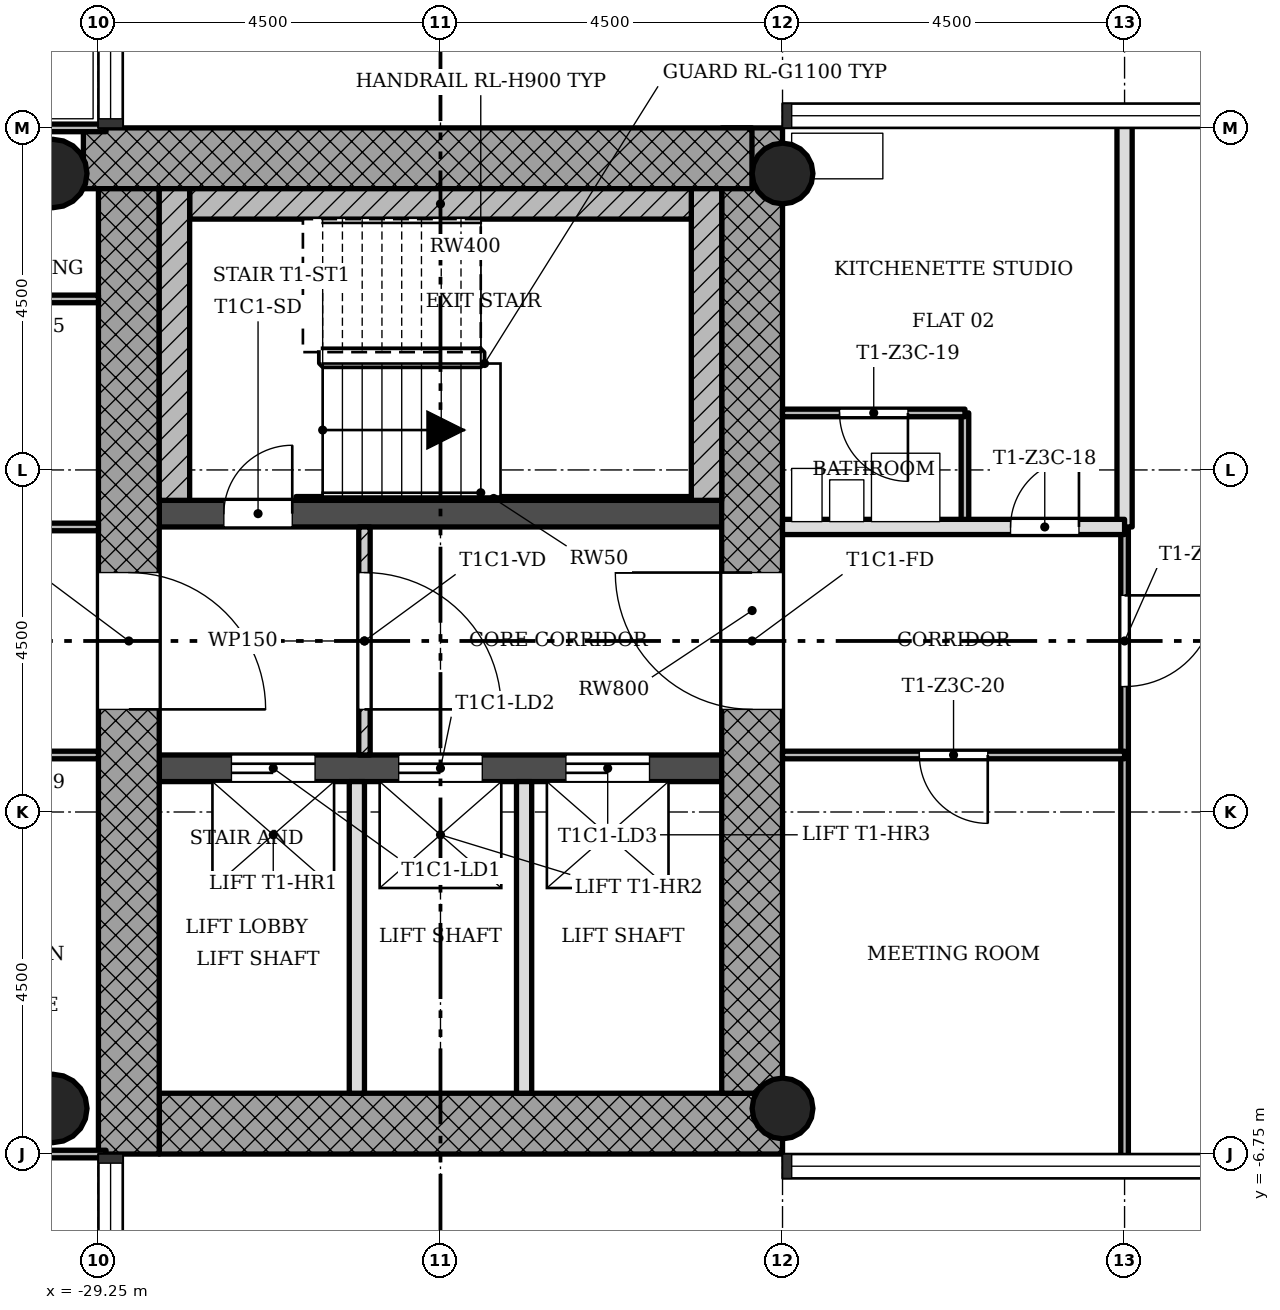
"""IFC4 building model, lengths in metres.
Left out: names, types, materials, properties, quantities, classifications, styles, units other than length and angle.
Written with IfcOpenShell. Run it as: python <this file> out.ifc"""

import sys

from ifc_helpers import new_model, si_unit, direction, frame, frame_2d, origin, origin_2d, place, context, subcontext, project, spatial, rectangle, hollow_circle, extrude, element, fill, save


model = new_model("IFC4")
c1 = context("Model", 3, precision=1e-05, world=origin(), true_north=direction((0.0, 1.0)))
c2 = subcontext(c1, "Body", "Model", "MODEL_VIEW")
j1 = project(units=[si_unit("LENGTHUNIT", "METRE"), si_unit("PLANEANGLEUNIT", "RADIAN")], contexts=[c1])
p1 = place(None, origin())
s1 = spatial("IfcSite", under=j1, at=p1, CompositionType="ELEMENT")
p2 = place(p1, origin())
s2 = spatial("IfcBuilding", under=s1, at=p2, CompositionType="ELEMENT")
p3 = place(p2, frame((0.0, 0.0, 160.9)))
s3 = spatial("IfcBuildingStorey", under=s2, at=p3, CompositionType="ELEMENT", Elevation=160.9)
p4 = place(p3, frame((-28.45, -6.35, 0.0), z_axis=(0.0, 0.0, 1.0), x_axis=(1.0, 0.0, 0.0)))
e1 = element("IfcWall", 1, at=p4, inside=s3, PredefinedType="SHEAR", context=c2, shape_type="SweptSolid", body=[
    extrude(rectangle(XDim=8.2, YDim=0.8, at=frame_2d((4.1, 0.0))), origin(), (0.0, 0.0, 1.0), 3.4),
])
p5 = place(p3, frame((-20.65, -5.95, 0.0), z_axis=(0.0, 0.0, 1.0), x_axis=(0.0, 1.0, 0.0)))
e2 = element("IfcWall", 2, at=p5, inside=s3, PredefinedType="SHEAR", context=c2, shape_type="SweptSolid", body=[
    extrude(rectangle(XDim=12.7, YDim=0.8, at=frame_2d((6.35, 0.0))), origin(), (0.0, 0.0, 1.0), 3.4),
])
p6 = place(p5, frame((5.05, 0.0, 0.0)))
e3 = element("IfcOpeningElement", 3, at=p6, cuts=e2, PredefinedType="OPENING", context=c2, shape_type="SweptSolid", body=[
    extrude(rectangle(XDim=1.8, YDim=2.1, at=frame_2d((0.9, 1.05))), frame((0.0, 0.41, 0.0), z_axis=(0.0, -1.0, 0.0), x_axis=(1.0, 0.0, 0.0)), (0.0, 0.0, 1.0), 0.82),
])
p7 = place(p3, frame((-20.652, 6.35, 0.0), z_axis=(0.0, 0.0, 1.0), x_axis=(-1.0, 0.0, 0.0)))
e4 = element("IfcWall", 4, at=p7, inside=s3, PredefinedType="SHEAR", context=c2, shape_type="SweptSolid", body=[
    extrude(rectangle(XDim=8.796, YDim=0.8, at=frame_2d((4.398, 0.0))), origin(), (0.0, 0.0, 1.0), 3.4),
])
p8 = place(p3, frame((-28.85, 5.95, 0.0), z_axis=(0.0, 0.0, 1.0), x_axis=(0.0, -1.0, 0.0)))
e5 = element("IfcWall", 5, at=p8, inside=s3, PredefinedType="SHEAR", context=c2, shape_type="SweptSolid", body=[
    extrude(rectangle(XDim=12.7, YDim=0.8, at=frame_2d((6.35, 0.0))), origin(), (0.0, 0.0, 1.0), 3.4),
])
p9 = place(p8, frame((5.05, 0.0, 0.0)))
e6 = element("IfcOpeningElement", 6, at=p9, cuts=e5, PredefinedType="OPENING", context=c2, shape_type="SweptSolid", body=[
    extrude(rectangle(XDim=1.8, YDim=2.1, at=frame_2d((0.9, 1.05))), frame((0.0, 0.41, 0.0), z_axis=(0.0, -1.0, 0.0), x_axis=(1.0, 0.0, 0.0)), (0.0, 0.0, 1.0), 0.82),
])
p10 = place(p3, frame((-28.45, -1.675, 0.0), z_axis=(0.0, 0.0, 1.0), x_axis=(1.0, 0.0, 0.0)))
e7 = element("IfcWall", 7, at=p10, inside=s3, PredefinedType="SHEAR", context=c2, shape_type="SweptSolid", body=[
    extrude(rectangle(XDim=7.4, YDim=0.35, at=frame_2d((3.7, 0.0))), origin(), (0.0, 0.0, 1.0), 3.4),
])
p11 = place(p10, frame((0.95, 0.0, 0.0)))
e8 = element("IfcOpeningElement", 8, at=p11, cuts=e7, PredefinedType="OPENING", context=c2, shape_type="SweptSolid", body=[
    extrude(rectangle(XDim=1.1, YDim=2.1, at=frame_2d((0.55, 1.05))), frame((0.0, 0.185, 0.0), z_axis=(0.0, -1.0, 0.0), x_axis=(1.0, 0.0, 0.0)), (0.0, 0.0, 1.0), 0.37),
])
p12 = place(p10, frame((3.15, 0.0, 0.0)))
e9 = element("IfcOpeningElement", 9, at=p12, cuts=e7, PredefinedType="OPENING", context=c2, shape_type="SweptSolid", body=[
    extrude(rectangle(XDim=1.1, YDim=2.1, at=frame_2d((0.55, 1.05))), frame((0.0, 0.185, 0.0), z_axis=(0.0, -1.0, 0.0), x_axis=(1.0, 0.0, 0.0)), (0.0, 0.0, 1.0), 0.37),
])
p13 = place(p10, frame((5.35, 0.0, 0.0)))
e10 = element("IfcOpeningElement", 10, at=p13, cuts=e7, PredefinedType="OPENING", context=c2, shape_type="SweptSolid", body=[
    extrude(rectangle(XDim=1.1, YDim=2.1, at=frame_2d((0.55, 1.05))), frame((0.0, 0.185, 0.0), z_axis=(0.0, -1.0, 0.0), x_axis=(1.0, 0.0, 0.0)), (0.0, 0.0, 1.0), 0.37),
])
p14 = place(p3, frame((-28.45, 1.675, 0.0), z_axis=(0.0, 0.0, 1.0), x_axis=(1.0, 0.0, 0.0)))
e11 = element("IfcWall", 11, at=p14, inside=s3, PredefinedType="SHEAR", context=c2, shape_type="SweptSolid", body=[
    extrude(rectangle(XDim=7.4, YDim=0.35, at=frame_2d((3.7, 0.0))), origin(), (0.0, 0.0, 1.0), 3.4),
])
p15 = place(p14, frame((0.85, 0.0, 0.0)))
e12 = element("IfcOpeningElement", 12, at=p15, cuts=e11, PredefinedType="OPENING", context=c2, shape_type="SweptSolid", body=[
    extrude(rectangle(XDim=0.9, YDim=2.1, at=frame_2d((0.45, 1.05))), frame((0.0, 0.185, 0.0), z_axis=(0.0, -1.0, 0.0), x_axis=(1.0, 0.0, 0.0)), (0.0, 0.0, 1.0), 0.37),
])
for number, where, z_axis, x_axis in (
    (13, (-20.25, -6.15, 0.0), (0.0, 0.0, 1.0), (1.0, 0.0, 0.0)),
    (14, (-20.25, 6.15, 0.0), (0.0, 0.0, 1.0), (1.0, 0.0, 0.0)),
):
    element("IfcColumn", number, at=place(p3, frame(where, z_axis=z_axis, x_axis=x_axis)), inside=s3, PredefinedType="COLUMN", context=c2, shape_type="SweptSolid", body=[
        extrude(hollow_circle(Radius=0.4, WallThickness=0.028, at=origin_2d()), origin(), (0.0, 0.0, 1.0), 3.4),
    ])
for number, where, z_axis, x_axis in (
    (15, (-29.85, -6.15, 0.0), (0.0, 0.0, 1.0), (1.0, 0.0, 0.0)),
    (16, (-29.85, 6.15, 0.0), (0.0, 0.0, 1.0), (1.0, 0.0, 0.0)),
):
    element("IfcColumn", number, at=place(p3, frame(where, z_axis=z_axis, x_axis=x_axis)), inside=s3, PredefinedType="COLUMN", context=c2, shape_type="SweptSolid", body=[
        extrude(hollow_circle(Radius=0.45, WallThickness=0.032, at=origin_2d()), origin(), (0.0, 0.0, 1.0), 3.4),
    ])
p16 = place(p3, frame((-25.75, -1.5, 0.0), z_axis=(0.0, 0.0, 1.0), x_axis=(0.0, 1.0, 0.0)))
e17 = element("IfcWall", 17, at=p16, inside=s3, PredefinedType="PARTITIONING", context=c2, shape_type="SweptSolid", body=[
    extrude(rectangle(XDim=3.0, YDim=0.15, at=frame_2d((1.5, 0.0))), origin(), (0.0, 0.0, 1.0), 3.0),
])
p17 = place(p16, frame((0.6, 0.0, 0.0)))
e18 = element("IfcOpeningElement", 18, at=p17, cuts=e17, PredefinedType="OPENING", context=c2, shape_type="SweptSolid", body=[
    extrude(rectangle(XDim=1.8, YDim=2.1, at=frame_2d((0.9, 1.05))), frame((0.0, 0.085, 0.0), z_axis=(0.0, -1.0, 0.0), x_axis=(1.0, 0.0, 0.0)), (0.0, 0.0, 1.0), 0.17),
])
for number, where, z_axis, x_axis in (
    (19, (-25.85, -5.95, 0.0), (0.0, 0.0, 1.0), (0.0, 1.0, 0.0)),
    (20, (-23.65, -5.95, 0.0), (0.0, 0.0, 1.0), (0.0, 1.0, 0.0)),
):
    element("IfcWall", number, at=place(p3, frame(where, z_axis=z_axis, x_axis=x_axis)), inside=s3, PredefinedType="SOLIDWALL", context=c2, shape_type="SweptSolid", body=[
        extrude(rectangle(XDim=4.1, YDim=0.2, at=frame_2d((2.05, 0.0))), origin(), (0.0, 0.0, 1.0), 3.0),
    ])
p18 = place(p3, frame((-17.85, 1.5, 0.0), z_axis=(0.0, 0.0, 1.0), x_axis=(0.0, 1.0, 0.0)))
e21 = element("IfcWall", 21, at=p18, inside=s3, PredefinedType="PARTITIONING", context=c2, shape_type="SweptSolid", body=[
    extrude(rectangle(XDim=1.5, YDim=0.1, at=frame_2d((0.75, 0.0))), origin(), (0.0, 0.0, 1.0), 3.0),
])
p19 = place(p3, frame((-15.75, -6.85, 0.0), z_axis=(0.0, 0.0, 1.0), x_axis=(0.0, 1.0, 0.0)))
e22 = element("IfcWall", 22, at=p19, inside=s3, PredefinedType="PARTITIONING", context=c2, shape_type="SweptSolid", body=[
    extrude(rectangle(XDim=8.35, YDim=0.1, at=frame_2d((4.175, 0.0))), origin(), (0.0, 0.0, 1.0), 3.0),
])
p20 = place(p19, frame((6.25, 0.0, 0.0)))
e23 = element("IfcOpeningElement", 23, at=p20, cuts=e22, PredefinedType="OPENING", context=c2, shape_type="SweptSolid", body=[
    extrude(rectangle(XDim=1.2, YDim=2.1, at=frame_2d((0.6, 1.05))), frame((0.0, 0.06, 0.0), z_axis=(0.0, -1.0, 0.0), x_axis=(1.0, 0.0, 0.0)), (0.0, 0.0, 1.0), 0.12),
])
p21 = place(p3, frame((-15.75, 1.5, 0.0), z_axis=(0.0, 0.0, 1.0), x_axis=(0.0, 1.0, 0.0)))
e24 = element("IfcWall", 24, at=p21, inside=s3, PredefinedType="SOLIDWALL", context=c2, shape_type="SweptSolid", body=[
    extrude(rectangle(XDim=5.35, YDim=0.2, at=frame_2d((2.675, 0.0))), origin(), (0.0, 0.0, 1.0), 3.0),
])
p22 = place(p3, frame((-35.1, -6.75, 0.0), z_axis=(0.0, 0.0, 1.0), x_axis=(1.0, 0.0, 0.0)))
e25 = element("IfcWall", 25, at=p22, inside=s3, PredefinedType="PARTITIONING", context=c2, shape_type="SweptSolid", body=[
    extrude(rectangle(XDim=5.95, YDim=0.1, at=frame_2d((2.975, 0.0))), origin(), (0.0, 0.0, 1.0), 3.0),
])
p23 = place(p3, frame((-31.5, -1.5, 0.0), z_axis=(0.0, 0.0, 1.0), x_axis=(1.0, 0.0, 0.0)))
e26 = element("IfcWall", 26, at=p23, inside=s3, PredefinedType="PARTITIONING", context=c2, shape_type="SweptSolid", body=[
    extrude(rectangle(XDim=2.25, YDim=0.1, at=frame_2d((1.125, 0.0))), origin(), (0.0, 0.0, 1.0), 3.0),
])
p24 = place(p3, frame((-20.25, -1.5, 0.0), z_axis=(0.0, 0.0, 1.0), x_axis=(1.0, 0.0, 0.0)))
e27 = element("IfcWall", 27, at=p24, inside=s3, PredefinedType="PARTITIONING", context=c2, shape_type="SweptSolid", body=[
    extrude(rectangle(XDim=4.5, YDim=0.1, at=frame_2d((2.25, 0.0))), origin(), (0.0, 0.0, 1.0), 3.0),
])
p25 = place(p24, frame((1.8, 0.0, 0.0)))
e28 = element("IfcOpeningElement", 28, at=p25, cuts=e27, PredefinedType="OPENING", context=c2, shape_type="SweptSolid", body=[
    extrude(rectangle(XDim=0.9, YDim=2.1, at=frame_2d((0.45, 1.05))), frame((0.0, 0.06, 0.0), z_axis=(0.0, -1.0, 0.0), x_axis=(1.0, 0.0, 0.0)), (0.0, 0.0, 1.0), 0.12),
])
p26 = place(p3, frame((-31.5, 1.5, 0.0), z_axis=(0.0, 0.0, 1.0), x_axis=(1.0, 0.0, 0.0)))
e29 = element("IfcWall", 29, at=p26, inside=s3, PredefinedType="PARTITIONING", context=c2, shape_type="SweptSolid", body=[
    extrude(rectangle(XDim=2.25, YDim=0.1, at=frame_2d((1.125, 0.0))), origin(), (0.0, 0.0, 1.0), 3.0),
])
p27 = place(p3, frame((-20.25, 1.5, 0.0), z_axis=(0.0, 0.0, 1.0), x_axis=(1.0, 0.0, 0.0)))
e30 = element("IfcWall", 30, at=p27, inside=s3, PredefinedType="SOLIDWALL", context=c2, shape_type="SweptSolid", body=[
    extrude(rectangle(XDim=4.5, YDim=0.2, at=frame_2d((2.25, 0.0))), origin(), (0.0, 0.0, 1.0), 3.0),
])
p28 = place(p27, frame((3.0, 0.0, 0.0)))
e31 = element("IfcOpeningElement", 31, at=p28, cuts=e30, PredefinedType="OPENING", context=c2, shape_type="SweptSolid", body=[
    extrude(rectangle(XDim=0.9, YDim=2.1, at=frame_2d((0.45, 1.05))), frame((0.0, 0.11, 0.0), z_axis=(0.0, -1.0, 0.0), x_axis=(1.0, 0.0, 0.0)), (0.0, 0.0, 1.0), 0.22),
])
p29 = place(p3, frame((-20.25, 3.0, 0.0), z_axis=(0.0, 0.0, 1.0), x_axis=(1.0, 0.0, 0.0)))
e32 = element("IfcWall", 32, at=p29, inside=s3, PredefinedType="PARTITIONING", context=c2, shape_type="SweptSolid", body=[
    extrude(rectangle(XDim=2.4, YDim=0.1, at=frame_2d((1.2, 0.0))), origin(), (0.0, 0.0, 1.0), 3.0),
])
p30 = place(p29, frame((0.75, 0.0, 0.0)))
e33 = element("IfcOpeningElement", 33, at=p30, cuts=e32, PredefinedType="OPENING", context=c2, shape_type="SweptSolid", body=[
    extrude(rectangle(XDim=0.9, YDim=2.1, at=frame_2d((0.45, 1.05))), frame((0.0, 0.06, 0.0), z_axis=(0.0, -1.0, 0.0), x_axis=(1.0, 0.0, 0.0)), (0.0, 0.0, 1.0), 0.12),
])
p31 = place(p3, frame((-35.1, 4.5, 0.0), z_axis=(0.0, 0.0, 1.0), x_axis=(1.0, 0.0, 0.0)))
e34 = element("IfcWall", 34, at=p31, inside=s3, PredefinedType="PARTITIONING", context=c2, shape_type="SweptSolid", body=[
    extrude(rectangle(XDim=5.85, YDim=0.1, at=frame_2d((2.925, 0.0))), origin(), (0.0, 0.0, 1.0), 3.0),
])
p32 = place(p31, frame((1.35, 0.0, 0.0)))
e35 = element("IfcOpeningElement", 35, at=p32, cuts=e34, PredefinedType="OPENING", context=c2, shape_type="SweptSolid", body=[
    extrude(rectangle(XDim=0.9, YDim=2.1, at=frame_2d((0.45, 1.05))), frame((0.0, 0.06, 0.0), z_axis=(0.0, -1.0, 0.0), x_axis=(1.0, 0.0, 0.0)), (0.0, 0.0, 1.0), 0.12),
])
p33 = place(p3, frame((-35.1, 6.75, 0.0), z_axis=(0.0, 0.0, 1.0), x_axis=(1.0, 0.0, 0.0)))
e36 = element("IfcWall", 36, at=p33, inside=s3, PredefinedType="PARTITIONING", context=c2, shape_type="SweptSolid", body=[
    extrude(rectangle(XDim=5.95, YDim=0.1, at=frame_2d((2.975, 0.0))), origin(), (0.0, 0.0, 1.0), 3.0),
])
p34 = place(p3, frame((-21.25, 1.85, 0.0), z_axis=(0.0, 0.0, 1.0), x_axis=(0.0, 1.0, 0.0)))
e37 = element("IfcWall", 37, at=p34, inside=s3, PredefinedType="SHEAR", context=c2, shape_type="SweptSolid", body=[
    extrude(rectangle(XDim=4.1, YDim=0.4, at=frame_2d((2.05, 0.0))), origin(), (0.0, 0.0, 1.0), 3.4),
])
p35 = place(p3, frame((-28.05, 5.75, 0.0), z_axis=(0.0, 0.0, 1.0), x_axis=(1.0, 0.0, 0.0)))
e38 = element("IfcWall", 38, at=p35, inside=s3, PredefinedType="SHEAR", context=c2, shape_type="SweptSolid", body=[
    extrude(rectangle(XDim=6.6, YDim=0.4, at=frame_2d((3.3, 0.0))), origin(), (0.0, 0.0, 1.0), 3.4),
])
p36 = place(p3, frame((-28.25, 1.85, 0.0), z_axis=(0.0, 0.0, 1.0), x_axis=(0.0, 1.0, 0.0)))
e39 = element("IfcWall", 39, at=p36, inside=s3, PredefinedType="SHEAR", context=c2, shape_type="SweptSolid", body=[
    extrude(rectangle(XDim=4.1, YDim=0.4, at=frame_2d((2.05, 0.0))), origin(), (0.0, 0.0, 1.0), 3.4),
])
p37 = place(p3, frame((-26.65, 1.875, 0.0), z_axis=(0.0, 0.0, 1.0), x_axis=(1.0, 0.0, 0.0)))
e40 = element("IfcWall", 40, at=p37, inside=s3, PredefinedType="SHEAR", context=c2, shape_type="SweptSolid", body=[
    extrude(rectangle(XDim=5.2, YDim=0.05, at=frame_2d((2.6, 0.0))), origin(), (0.0, 0.0, 1.0), 3.4),
])
p38 = place(p17, origin())
e41 = element("IfcDoor", 41, at=p38, inside=s3, OperationType="SINGLE_SWING_LEFT", PredefinedType="DOOR", context=c2, shape_type="SweptSolid", body=[
    extrude(rectangle(XDim=1.8, YDim=2.1, at=frame_2d((0.9, 1.05))), frame((0.0, 0.025, 0.0), z_axis=(0.0, -1.0, 0.0), x_axis=(1.0, 0.0, 0.0)), (0.0, 0.0, 1.0), 0.05),
])
fill(e18, e41)
p39 = place(p28, origin())
e42 = element("IfcDoor", 42, at=p39, inside=s3, OperationType="SINGLE_SWING_LEFT", PredefinedType="DOOR", context=c2, shape_type="SweptSolid", body=[
    extrude(rectangle(XDim=0.9, YDim=2.1, at=frame_2d((0.45, 1.05))), frame((0.0, 0.025, 0.0), z_axis=(0.0, -1.0, 0.0), x_axis=(1.0, 0.0, 0.0)), (0.0, 0.0, 1.0), 0.05),
])
fill(e31, e42)
p40 = place(p30, origin())
e43 = element("IfcDoor", 43, at=p40, inside=s3, OperationType="SINGLE_SWING_RIGHT", PredefinedType="DOOR", context=c2, shape_type="SweptSolid", body=[
    extrude(rectangle(XDim=0.9, YDim=2.1, at=frame_2d((0.45, 1.05))), frame((0.0, 0.025, 0.0), z_axis=(0.0, -1.0, 0.0), x_axis=(1.0, 0.0, 0.0)), (0.0, 0.0, 1.0), 0.05),
])
fill(e33, e43)
p41 = place(p25, origin())
e44 = element("IfcDoor", 44, at=p41, inside=s3, OperationType="SINGLE_SWING_RIGHT", PredefinedType="DOOR", context=c2, shape_type="SweptSolid", body=[
    extrude(rectangle(XDim=0.9, YDim=2.1, at=frame_2d((0.45, 1.05))), frame((0.0, 0.025, 0.0), z_axis=(0.0, -1.0, 0.0), x_axis=(1.0, 0.0, 0.0)), (0.0, 0.0, 1.0), 0.05),
])
fill(e28, e44)
p42 = place(p20, origin())
e45 = element("IfcDoor", 45, at=p42, inside=s3, OperationType="SINGLE_SWING_RIGHT", PredefinedType="DOOR", context=c2, shape_type="SweptSolid", body=[
    extrude(rectangle(XDim=1.2, YDim=2.1, at=frame_2d((0.6, 1.05))), frame((0.0, 0.025, 0.0), z_axis=(0.0, -1.0, 0.0), x_axis=(1.0, 0.0, 0.0)), (0.0, 0.0, 1.0), 0.05),
])
fill(e23, e45)
p43 = place(p15, origin())
e46 = element("IfcDoor", 46, at=p43, inside=s3, OperationType="SINGLE_SWING_LEFT", PredefinedType="DOOR", context=c2, shape_type="SweptSolid", body=[
    extrude(rectangle(XDim=0.9, YDim=2.1, at=frame_2d((0.45, 1.05))), frame((0.0, 0.025, 0.0), z_axis=(0.0, -1.0, 0.0), x_axis=(1.0, 0.0, 0.0)), (0.0, 0.0, 1.0), 0.05),
])
fill(e12, e46)
p44 = place(p11, origin())
e47 = element("IfcDoor", 47, at=p44, inside=s3, OperationType="SLIDING_TO_LEFT", PredefinedType="DOOR", context=c2, shape_type="SweptSolid", body=[
    extrude(rectangle(XDim=1.1, YDim=2.1, at=frame_2d((0.55, 1.05))), frame((0.0, 0.025, 0.0), z_axis=(0.0, -1.0, 0.0), x_axis=(1.0, 0.0, 0.0)), (0.0, 0.0, 1.0), 0.05),
])
fill(e8, e47)
p45 = place(p12, origin())
e48 = element("IfcDoor", 48, at=p45, inside=s3, OperationType="SLIDING_TO_LEFT", PredefinedType="DOOR", context=c2, shape_type="SweptSolid", body=[
    extrude(rectangle(XDim=1.1, YDim=2.1, at=frame_2d((0.55, 1.05))), frame((0.0, 0.025, 0.0), z_axis=(0.0, -1.0, 0.0), x_axis=(1.0, 0.0, 0.0)), (0.0, 0.0, 1.0), 0.05),
])
fill(e9, e48)
p46 = place(p13, origin())
e49 = element("IfcDoor", 49, at=p46, inside=s3, OperationType="SLIDING_TO_LEFT", PredefinedType="DOOR", context=c2, shape_type="SweptSolid", body=[
    extrude(rectangle(XDim=1.1, YDim=2.1, at=frame_2d((0.55, 1.05))), frame((0.0, 0.025, 0.0), z_axis=(0.0, -1.0, 0.0), x_axis=(1.0, 0.0, 0.0)), (0.0, 0.0, 1.0), 0.05),
])
fill(e10, e49)
p47 = place(p9, origin())
e50 = element("IfcDoor", 50, at=p47, inside=s3, OperationType="SINGLE_SWING_LEFT", PredefinedType="DOOR", context=c2, shape_type="SweptSolid", body=[
    extrude(rectangle(XDim=1.8, YDim=2.1, at=frame_2d((0.9, 1.05))), frame((0.0, 0.025, 0.0), z_axis=(0.0, -1.0, 0.0), x_axis=(1.0, 0.0, 0.0)), (0.0, 0.0, 1.0), 0.05),
])
fill(e6, e50)
p48 = place(p6, origin())
e51 = element("IfcDoor", 51, at=p48, inside=s3, OperationType="SINGLE_SWING_LEFT", PredefinedType="DOOR", context=c2, shape_type="SweptSolid", body=[
    extrude(rectangle(XDim=1.8, YDim=2.1, at=frame_2d((0.9, 1.05))), frame((0.0, 0.025, 0.0), z_axis=(0.0, -1.0, 0.0), x_axis=(1.0, 0.0, 0.0)), (0.0, 0.0, 1.0), 0.05),
])
fill(e3, e51)
save(model, sys.argv[1])
